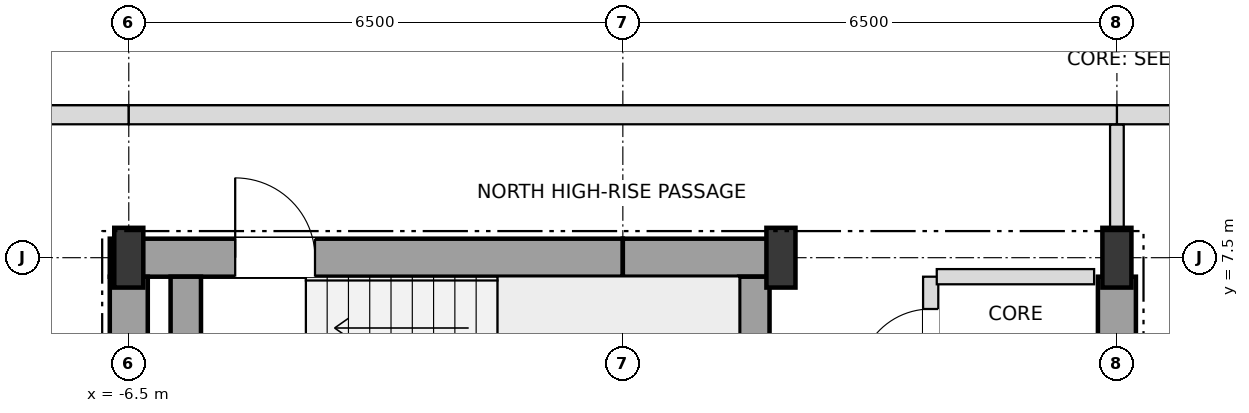
"""IFC4 building model, lengths in metres.
Left out: names, types, materials, properties, quantities, classifications, styles, units other than length and angle.
Written with IfcOpenShell. Run it as: python <this file> out.ifc"""

import sys

from ifc_helpers import new_model, si_unit, direction, frame, frame_2d, origin, origin_2d, place, context, subcontext, project, spatial, rectangle, i_section, extrude, element, fill, save


model = new_model("IFC4")
c1 = context("Model", 3, precision=1e-05, world=origin(), true_north=direction((0.0, 1.0)))
c2 = subcontext(c1, "Body", "Model", "MODEL_VIEW")
j1 = project(units=[si_unit("LENGTHUNIT", "METRE"), si_unit("PLANEANGLEUNIT", "RADIAN")], contexts=[c1])
p1 = place(None, origin())
s1 = spatial("IfcSite", under=j1, at=p1, CompositionType="ELEMENT")
p2 = place(p1, origin())
s2 = spatial("IfcBuilding", under=s1, at=p2, CompositionType="ELEMENT")
p3 = place(p2, frame((0.0, 0.0, 265.5)))
s3 = spatial("IfcBuildingStorey", under=s2, at=p3, CompositionType="ELEMENT", Elevation=265.5)
for number, where, z_axis, x_axis in (
    (1, (-6.5, 7.5, 0.0), (0.0, 0.0, 1.0), (1.0, 0.0, 0.0)),
    (2, (2.08, 7.5, 0.0), (0.0, 0.0, 1.0), (1.0, 0.0, 0.0)),
    (3, (6.5, 7.5, 0.0), (0.0, 0.0, 1.0), (1.0, 0.0, 0.0)),
):
    element("IfcColumn", number, at=place(p3, frame(where, z_axis=z_axis, x_axis=x_axis)), inside=s3, PredefinedType="COLUMN", context=c2, shape_type="SweptSolid", body=[
        extrude(i_section(OverallWidth=0.382, OverallDepth=0.786, WebThickness=0.02, FlangeThickness=0.033, at=origin_2d()), origin(), (0.0, 0.0, 1.0), 3.6),
    ])
p4 = place(p3, frame((-16.9, 9.38, 0.0), z_axis=(0.0, 0.0, 1.0), x_axis=(1.0, 0.0, 0.0)))
e4 = element("IfcWall", 4, at=p4, inside=s3, PredefinedType="SOLIDWALL", context=c2, shape_type="SweptSolid", body=[
    extrude(rectangle(XDim=10.4, YDim=0.25, at=frame_2d((5.2, 0.0))), origin(), (0.0, 0.0, 1.0), 2.826),
])
p5 = place(p3, frame((6.5, 9.38, 0.0), z_axis=(0.0, 0.0, 1.0), x_axis=(1.0, 0.0, 0.0)))
e5 = element("IfcWall", 5, at=p5, inside=s3, PredefinedType="SOLIDWALL", context=c2, shape_type="SweptSolid", body=[
    extrude(rectangle(XDim=10.4, YDim=0.25, at=frame_2d((5.2, 0.0))), origin(), (0.0, 0.0, 1.0), 2.826),
])
p6 = place(p5, frame((0.85, 0.0, 0.72)))
e6 = element("IfcOpeningElement", 6, at=p6, cuts=e5, PredefinedType="OPENING", context=c2, shape_type="SweptSolid", body=[
    extrude(rectangle(XDim=1.8, YDim=1.68, at=frame_2d((0.9, 0.84))), frame((0.0, 0.135, 0.0), z_axis=(0.0, -1.0, 0.0), x_axis=(1.0, 0.0, 0.0)), (0.0, 0.0, 1.0), 0.27),
])
p7 = place(p5, frame((4.405, 0.0, 0.72)))
e7 = element("IfcOpeningElement", 7, at=p7, cuts=e5, PredefinedType="OPENING", context=c2, shape_type="SweptSolid", body=[
    extrude(rectangle(XDim=1.8, YDim=1.68, at=frame_2d((0.9, 0.84))), frame((0.0, 0.135, 0.0), z_axis=(0.0, -1.0, 0.0), x_axis=(1.0, 0.0, 0.0)), (0.0, 0.0, 1.0), 0.27),
])
p8 = place(p5, frame((7.695, 0.0, 0.72)))
e8 = element("IfcOpeningElement", 8, at=p8, cuts=e5, PredefinedType="OPENING", context=c2, shape_type="SweptSolid", body=[
    extrude(rectangle(XDim=1.8, YDim=1.68, at=frame_2d((0.9, 0.84))), frame((0.0, 0.135, 0.0), z_axis=(0.0, -1.0, 0.0), x_axis=(1.0, 0.0, 0.0)), (0.0, 0.0, 1.0), 0.27),
])
p9 = place(p3, frame((-6.5, 9.38, 0.0), z_axis=(0.0, 0.0, 1.0), x_axis=(1.0, 0.0, 0.0)))
e9 = element("IfcWall", 9, at=p9, inside=s3, PredefinedType="SOLIDWALL", context=c2, shape_type="SweptSolid", body=[
    extrude(rectangle(XDim=13.0, YDim=0.25, at=frame_2d((6.5, 0.0))), origin(), (0.0, 0.0, 1.0), 2.826),
])
p10 = place(p3, frame((-6.75, 7.5, 0.0), z_axis=(0.0, 0.0, 1.0), x_axis=(1.0, 0.0, 0.0)))
e10 = element("IfcWall", 10, at=p10, inside=s3, PredefinedType="SHEAR", context=c2, shape_type="SweptSolid", body=[
    extrude(rectangle(XDim=6.75, YDim=0.5, at=frame_2d((3.375, 0.0))), origin(), (0.0, 0.0, 1.0), 3.38),
])
p11 = place(p10, frame((1.65, 0.0, 0.0)))
e11 = element("IfcOpeningElement", 11, at=p11, cuts=e10, PredefinedType="OPENING", context=c2, shape_type="SweptSolid", body=[
    extrude(rectangle(XDim=1.05, YDim=2.15, at=frame_2d((0.525, 1.075))), frame((0.0, 0.26, 0.0), z_axis=(0.0, -1.0, 0.0), x_axis=(1.0, 0.0, 0.0)), (0.0, 0.0, 1.0), 0.52),
])
p12 = place(p3, frame((0.0, 7.5, 0.0), z_axis=(0.0, 0.0, 1.0), x_axis=(1.0, 0.0, 0.0)))
e12 = element("IfcWall", 12, at=p12, inside=s3, PredefinedType="SHEAR", context=c2, shape_type="SweptSolid", body=[
    extrude(rectangle(XDim=2.08, YDim=0.5, at=frame_2d((1.04, 0.0))), origin(), (0.0, 0.0, 1.0), 3.38),
])
for number, where, z_axis, x_axis in (
    (13, (-6.5, 3.95, 0.0), (0.0, 0.0, 1.0), (0.0, 1.0, 0.0)),
    (14, (6.5, 3.95, 0.0), (0.0, 0.0, 1.0), (0.0, 1.0, 0.0)),
):
    element("IfcWall", number, at=place(p3, frame(where, z_axis=z_axis, x_axis=x_axis)), inside=s3, PredefinedType="SHEAR", context=c2, shape_type="SweptSolid", body=[
        extrude(rectangle(XDim=3.3, YDim=0.5, at=frame_2d((1.65, 0.0))), origin(), (0.0, 0.0, 1.0), 3.38),
    ])
for number, where, z_axis, x_axis in (
    (15, (1.73, 3.95, 0.0), (0.0, 0.0, 1.0), (0.0, 1.0, 0.0)),
    (16, (-5.75, 3.95, 0.0), (0.0, 0.0, 1.0), (0.0, 1.0, 0.0)),
):
    element("IfcWall", number, at=place(p3, frame(where, z_axis=z_axis, x_axis=x_axis)), inside=s3, PredefinedType="SHEAR", context=c2, shape_type="SweptSolid", body=[
        extrude(rectangle(XDim=3.3, YDim=0.4, at=frame_2d((1.65, 0.0))), origin(), (0.0, 0.0, 1.0), 3.38),
    ])
p13 = place(p3, frame((4.05, 5.55, 0.0), z_axis=(0.0, 0.0, 1.0), x_axis=(0.0, 1.0, 0.0)))
e17 = element("IfcWall", 17, at=p13, inside=s3, PredefinedType="SOLIDWALL", context=c2, shape_type="SweptSolid", body=[
    extrude(rectangle(XDim=1.7, YDim=0.2, at=frame_2d((0.85, 0.0))), origin(), (0.0, 0.0, 1.0), 3.38),
])
p14 = place(p13, frame((0.325, 0.0, 0.0)))
e18 = element("IfcOpeningElement", 18, at=p14, cuts=e17, PredefinedType="OPENING", context=c2, shape_type="SweptSolid", body=[
    extrude(rectangle(XDim=0.95, YDim=2.15, at=frame_2d((0.475, 1.075))), frame((0.0, 0.11, 0.0), z_axis=(0.0, -1.0, 0.0), x_axis=(1.0, 0.0, 0.0)), (0.0, 0.0, 1.0), 0.22),
])
p15 = place(p3, frame((6.5, 7.31, 0.0), z_axis=(0.0, 0.0, 1.0), x_axis=(0.0, 1.0, 0.0)))
e19 = element("IfcWall", 19, at=p15, inside=s3, PredefinedType="PARTITIONING", context=c2, shape_type="SweptSolid", body=[
    extrude(rectangle(XDim=1.94, YDim=0.18, at=frame_2d((0.97, 0.0))), origin(), (0.0, 0.0, 1.0), 2.826),
])
p16 = place(p3, frame((4.13, 7.25, 0.0), z_axis=(0.0, 0.0, 1.0), x_axis=(1.0, 0.0, 0.0)))
e20 = element("IfcWall", 20, at=p16, inside=s3, PredefinedType="SOLIDWALL", context=c2, shape_type="SweptSolid", body=[
    extrude(rectangle(XDim=2.07, YDim=0.2, at=frame_2d((1.035, 0.0))), origin(), (0.0, 0.0, 1.0), 3.38),
])
p17 = place(p11, origin())
e21 = element("IfcDoor", 21, at=p17, inside=s3, OperationType="SINGLE_SWING_LEFT", PredefinedType="DOOR", context=c2, shape_type="SweptSolid", body=[
    extrude(rectangle(XDim=1.05, YDim=2.15, at=frame_2d((0.525, 1.075))), frame((0.0, 0.025, 0.0), z_axis=(0.0, -1.0, 0.0), x_axis=(1.0, 0.0, 0.0)), (0.0, 0.0, 1.0), 0.05),
])
fill(e11, e21)
p18 = place(p14, origin())
e22 = element("IfcDoor", 22, at=p18, inside=s3, OperationType="SINGLE_SWING_LEFT", PredefinedType="DOOR", context=c2, shape_type="SweptSolid", body=[
    extrude(rectangle(XDim=0.95, YDim=2.15, at=frame_2d((0.475, 1.075))), frame((0.0, 0.025, 0.0), z_axis=(0.0, -1.0, 0.0), x_axis=(1.0, 0.0, 0.0)), (0.0, 0.0, 1.0), 0.05),
])
fill(e18, e22)
save(model, sys.argv[1])
